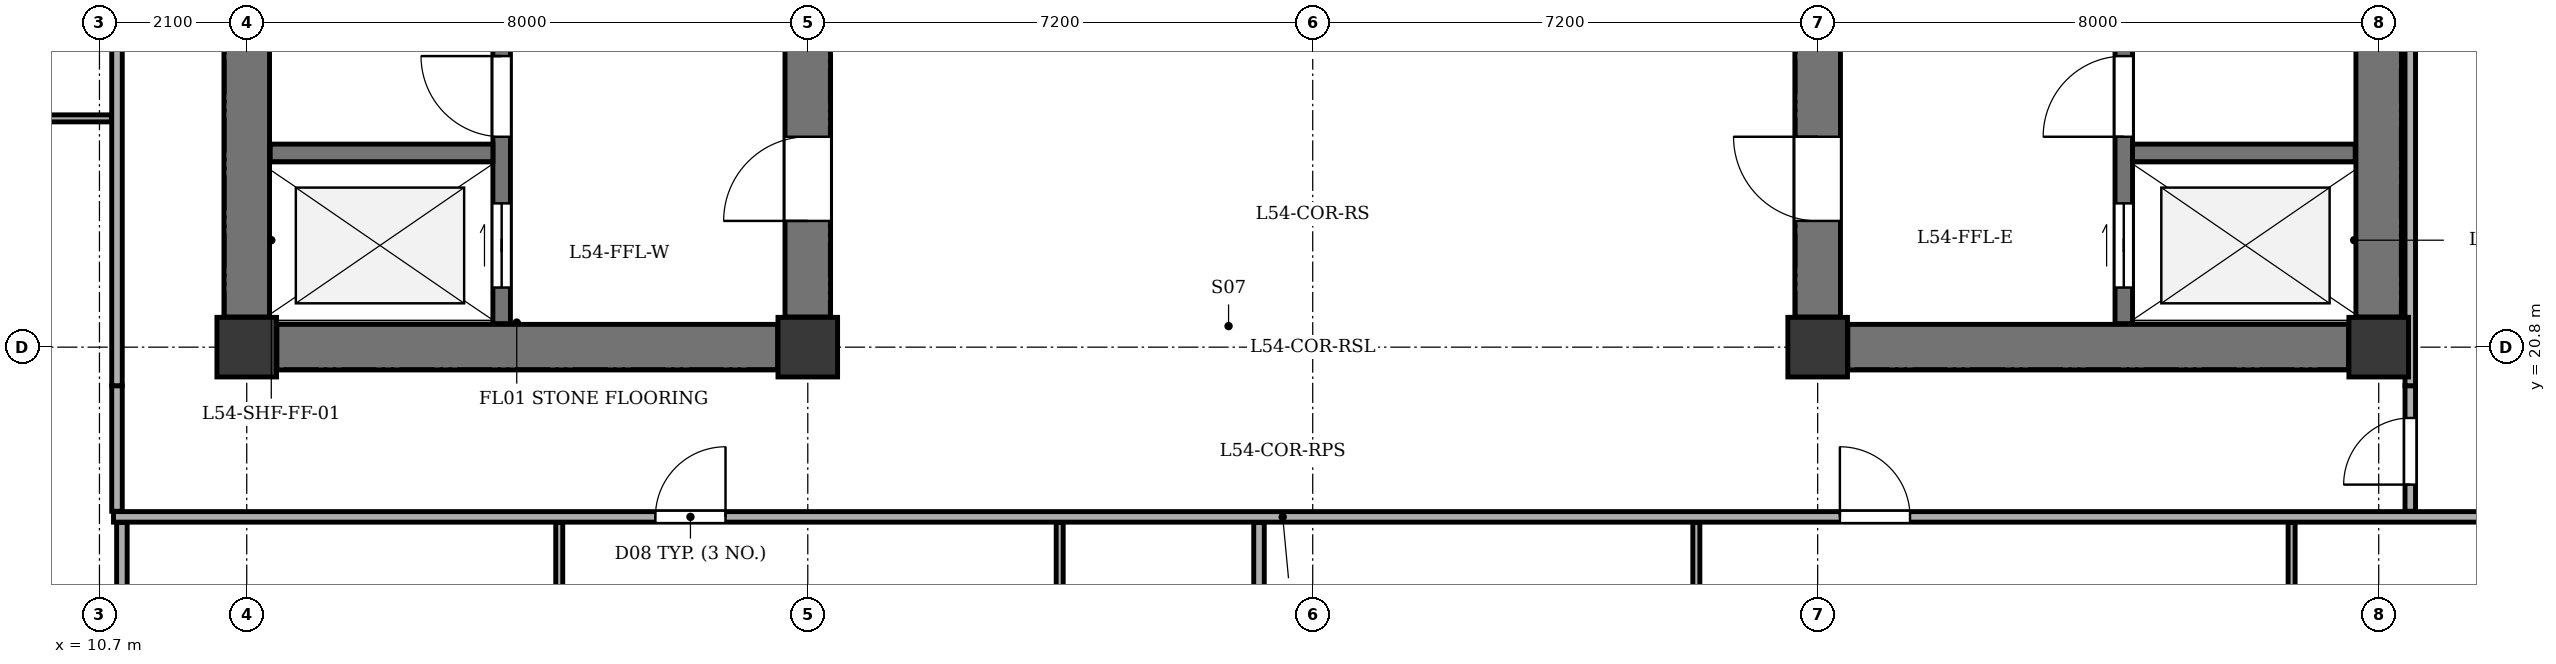
"""IFC4 building model, lengths in metres.
Left out: names, types, materials, properties, quantities, classifications, styles, units other than length and angle.
Written with IfcOpenShell. Run it as: python <this file> out.ifc"""

import sys

from ifc_helpers import new_model, si_unit, direction, frame, frame_2d, origin, origin_2d, place, context, subcontext, project, spatial, rectangle, extrude, element, fill, save


model = new_model("IFC4")
c1 = context("Model", 3, precision=1e-05, world=origin(), true_north=direction((0.0, 1.0)))
c2 = subcontext(c1, "Body", "Model", "MODEL_VIEW")
j1 = project(units=[si_unit("LENGTHUNIT", "METRE"), si_unit("PLANEANGLEUNIT", "RADIAN")], contexts=[c1])
p1 = place(None, origin())
s1 = spatial("IfcSite", under=j1, at=p1, CompositionType="ELEMENT")
p2 = place(p1, origin())
s2 = spatial("IfcBuilding", under=s1, at=p2, CompositionType="ELEMENT")
p3 = place(p2, frame((0.0, 0.0, 210.9)))
s3 = spatial("IfcBuildingStorey", under=s2, at=p3, CompositionType="ELEMENT", Elevation=210.9)
for number, where, z_axis, x_axis in (
    (1, (12.8, 20.8, 0.0), (0.0, 0.0, 1.0), (1.0, 0.0, 0.0)),
    (2, (20.8, 20.8, 0.0), (0.0, 0.0, 1.0), (1.0, 0.0, 0.0)),
    (3, (35.2, 20.8, 0.0), (0.0, 0.0, 1.0), (1.0, 0.0, 0.0)),
    (4, (43.2, 20.8, 0.0), (0.0, 0.0, 1.0), (1.0, 0.0, 0.0)),
):
    element("IfcColumn", number, at=place(p3, frame(where, z_axis=z_axis, x_axis=x_axis)), inside=s3, PredefinedType="COLUMN", context=c2, shape_type="SweptSolid", body=[
        extrude(rectangle(XDim=0.85, YDim=0.85, at=origin_2d()), origin(), (0.0, 0.0, 1.0), 3.4),
    ])
p4 = place(p3, frame((12.8, 21.23, 0.0), z_axis=(0.0, 0.0, 1.0), x_axis=(0.0, 1.0, 0.0)))
e5 = element("IfcWall", 5, at=p4, inside=s3, PredefinedType="SHEAR", context=c2, shape_type="SweptSolid", body=[
    extrude(rectangle(XDim=11.94, YDim=0.65, at=frame_2d((5.97, 0.0))), origin(), (0.0, 0.0, 1.0), 3.1),
])
p5 = place(p3, frame((13.23, 20.8, 0.0), z_axis=(0.0, 0.0, 1.0), x_axis=(1.0, 0.0, 0.0)))
e6 = element("IfcWall", 6, at=p5, inside=s3, PredefinedType="SHEAR", context=c2, shape_type="SweptSolid", body=[
    extrude(rectangle(XDim=7.14, YDim=0.65, at=frame_2d((3.57, 0.0))), origin(), (0.0, 0.0, 1.0), 3.1),
])
p6 = place(p3, frame((20.8, 21.23, 0.0), z_axis=(0.0, 0.0, 1.0), x_axis=(0.0, 1.0, 0.0)))
e7 = element("IfcWall", 7, at=p6, inside=s3, PredefinedType="SHEAR", context=c2, shape_type="SweptSolid", body=[
    extrude(rectangle(XDim=3.82, YDim=0.65, at=frame_2d((1.91, 0.0))), origin(), (0.0, 0.0, 1.0), 3.1),
])
p7 = place(p6, frame((1.37, 0.0, 0.0)))
e8 = element("IfcOpeningElement", 8, at=p7, cuts=e7, PredefinedType="OPENING", context=c2, shape_type="SweptSolid", body=[
    extrude(rectangle(XDim=1.2, YDim=2.15, at=frame_2d((0.6, 1.075))), frame((0.0, 0.335, 0.0), z_axis=(0.0, -1.0, 0.0), x_axis=(1.0, 0.0, 0.0)), (0.0, 0.0, 1.0), 0.67),
])
p8 = place(p3, frame((16.435, 21.135, 0.0), z_axis=(0.0, 0.0, 1.0), x_axis=(0.0, 1.0, 0.0)))
e9 = element("IfcWall", 9, at=p8, inside=s3, PredefinedType="SHEAR", context=c2, shape_type="SweptSolid", body=[
    extrude(rectangle(XDim=12.13, YDim=0.25, at=frame_2d((6.065, 0.0))), origin(), (0.0, 0.0, 1.0), 3.1),
])
p9 = place(p8, frame((0.515, 0.0, 0.0)))
e10 = element("IfcOpeningElement", 10, at=p9, cuts=e9, PredefinedType="OPENING", context=c2, shape_type="SweptSolid", body=[
    extrude(rectangle(XDim=1.2, YDim=2.15, at=frame_2d((0.6, 1.075))), frame((0.0, 0.135, 0.0), z_axis=(0.0, -1.0, 0.0), x_axis=(1.0, 0.0, 0.0)), (0.0, 0.0, 1.0), 0.27),
])
p10 = place(p8, frame((2.665, 0.0, 0.0)))
e11 = element("IfcOpeningElement", 11, at=p10, cuts=e9, PredefinedType="OPENING", context=c2, shape_type="SweptSolid", body=[
    extrude(rectangle(XDim=1.15, YDim=2.15, at=frame_2d((0.575, 1.075))), frame((0.0, 0.135, 0.0), z_axis=(0.0, -1.0, 0.0), x_axis=(1.0, 0.0, 0.0)), (0.0, 0.0, 1.0), 0.27),
])
p11 = place(p3, frame((13.135, 23.57, 0.0), z_axis=(0.0, 0.0, 1.0), x_axis=(1.0, 0.0, 0.0)))
e12 = element("IfcWall", 12, at=p11, inside=s3, PredefinedType="SHEAR", context=c2, shape_type="SweptSolid", body=[
    extrude(rectangle(XDim=3.175, YDim=0.25, at=frame_2d((1.587, 0.0))), origin(), (0.0, 0.0, 1.0), 3.1),
])
p12 = place(p3, frame((43.2, 21.23, 0.0), z_axis=(0.0, 0.0, 1.0), x_axis=(0.0, 1.0, 0.0)))
e13 = element("IfcWall", 13, at=p12, inside=s3, PredefinedType="SHEAR", context=c2, shape_type="SweptSolid", body=[
    extrude(rectangle(XDim=11.94, YDim=0.65, at=frame_2d((5.97, 0.0))), origin(), (0.0, 0.0, 1.0), 3.1),
])
p13 = place(p3, frame((35.63, 20.8, 0.0), z_axis=(0.0, 0.0, 1.0), x_axis=(1.0, 0.0, 0.0)))
e14 = element("IfcWall", 14, at=p13, inside=s3, PredefinedType="SHEAR", context=c2, shape_type="SweptSolid", body=[
    extrude(rectangle(XDim=7.14, YDim=0.65, at=frame_2d((3.57, 0.0))), origin(), (0.0, 0.0, 1.0), 3.1),
])
p14 = place(p3, frame((35.2, 21.23, 0.0), z_axis=(0.0, 0.0, 1.0), x_axis=(0.0, 1.0, 0.0)))
e15 = element("IfcWall", 15, at=p14, inside=s3, PredefinedType="SHEAR", context=c2, shape_type="SweptSolid", body=[
    extrude(rectangle(XDim=3.82, YDim=0.65, at=frame_2d((1.91, 0.0))), origin(), (0.0, 0.0, 1.0), 3.1),
])
p15 = place(p14, frame((1.37, 0.0, 0.0)))
e16 = element("IfcOpeningElement", 16, at=p15, cuts=e15, PredefinedType="OPENING", context=c2, shape_type="SweptSolid", body=[
    extrude(rectangle(XDim=1.2, YDim=2.15, at=frame_2d((0.6, 1.075))), frame((0.0, 0.335, 0.0), z_axis=(0.0, -1.0, 0.0), x_axis=(1.0, 0.0, 0.0)), (0.0, 0.0, 1.0), 0.67),
])
p16 = place(p3, frame((39.565, 21.135, 0.0), z_axis=(0.0, 0.0, 1.0), x_axis=(0.0, 1.0, 0.0)))
e17 = element("IfcWall", 17, at=p16, inside=s3, PredefinedType="SHEAR", context=c2, shape_type="SweptSolid", body=[
    extrude(rectangle(XDim=12.13, YDim=0.25, at=frame_2d((6.065, 0.0))), origin(), (0.0, 0.0, 1.0), 3.1),
])
p17 = place(p16, frame((0.515, 0.0, 0.0)))
e18 = element("IfcOpeningElement", 18, at=p17, cuts=e17, PredefinedType="OPENING", context=c2, shape_type="SweptSolid", body=[
    extrude(rectangle(XDim=1.2, YDim=2.15, at=frame_2d((0.6, 1.075))), frame((0.0, 0.135, 0.0), z_axis=(0.0, -1.0, 0.0), x_axis=(1.0, 0.0, 0.0)), (0.0, 0.0, 1.0), 0.27),
])
p18 = place(p16, frame((2.665, 0.0, 0.0)))
e19 = element("IfcOpeningElement", 19, at=p18, cuts=e17, PredefinedType="OPENING", context=c2, shape_type="SweptSolid", body=[
    extrude(rectangle(XDim=1.15, YDim=2.15, at=frame_2d((0.575, 1.075))), frame((0.0, 0.135, 0.0), z_axis=(0.0, -1.0, 0.0), x_axis=(1.0, 0.0, 0.0)), (0.0, 0.0, 1.0), 0.27),
])
p19 = place(p3, frame((39.69, 23.57, 0.0), z_axis=(0.0, 0.0, 1.0), x_axis=(1.0, 0.0, 0.0)))
e20 = element("IfcWall", 20, at=p19, inside=s3, PredefinedType="SHEAR", context=c2, shape_type="SweptSolid", body=[
    extrude(rectangle(XDim=3.175, YDim=0.25, at=frame_2d((1.587, 0.0))), origin(), (0.0, 0.0, 1.0), 3.1),
])
p20 = place(p3, frame((10.9, 18.38, 0.0), z_axis=(0.0, 0.0, 1.0), x_axis=(1.0, 0.0, 0.0)))
e21 = element("IfcWall", 21, at=p20, inside=s3, PredefinedType="PARTITIONING", context=c2, shape_type="SweptSolid", body=[
    extrude(rectangle(XDim=34.02, YDim=0.15, at=frame_2d((17.01, 0.0))), origin(), (0.0, 0.0, 1.0), 3.1),
])
p21 = place(p20, frame((7.727, 0.0, 0.0)))
e22 = element("IfcOpeningElement", 22, at=p21, cuts=e21, PredefinedType="OPENING", context=c2, shape_type="SweptSolid", body=[
    extrude(rectangle(XDim=1.0, YDim=2.1, at=frame_2d((0.5, 1.05))), frame((0.0, 0.085, 0.0), z_axis=(0.0, -1.0, 0.0), x_axis=(1.0, 0.0, 0.0)), (0.0, 0.0, 1.0), 0.17),
])
p22 = place(p20, frame((24.617, 0.0, 0.0)))
e23 = element("IfcOpeningElement", 23, at=p22, cuts=e21, PredefinedType="OPENING", context=c2, shape_type="SweptSolid", body=[
    extrude(rectangle(XDim=1.0, YDim=2.1, at=frame_2d((0.5, 1.05))), frame((0.0, 0.085, 0.0), z_axis=(0.0, -1.0, 0.0), x_axis=(1.0, 0.0, 0.0)), (0.0, 0.0, 1.0), 0.17),
])
p23 = place(p3, frame((11.02, 3.045, 0.0), z_axis=(0.0, 0.0, 1.0), x_axis=(0.0, 1.0, 0.0)))
e24 = element("IfcWall", 24, at=p23, inside=s3, PredefinedType="PARTITIONING", context=c2, shape_type="SweptSolid", body=[
    extrude(rectangle(XDim=15.255, YDim=0.15, at=frame_2d((7.627, 0.0))), origin(), (0.0, 0.0, 1.0), 3.1),
])
p24 = place(p3, frame((24.392, 5.605, 0.0), z_axis=(0.0, 0.0, 1.0), x_axis=(0.0, 1.0, 0.0)))
e25 = element("IfcWall", 25, at=p24, inside=s3, PredefinedType="PARTITIONING", context=c2, shape_type="SweptSolid", body=[
    extrude(rectangle(XDim=12.695, YDim=0.1, at=frame_2d((6.348, 0.0))), origin(), (0.0, 0.0, 1.0), 3.1),
])
p25 = place(p24, frame((5.91, 0.0, 0.0)))
e26 = element("IfcOpeningElement", 26, at=p25, cuts=e25, PredefinedType="OPENING", context=c2, shape_type="SweptSolid", body=[
    extrude(rectangle(XDim=0.9, YDim=2.05, at=frame_2d((0.45, 1.025))), frame((0.0, 0.06, 0.0), z_axis=(0.0, -1.0, 0.0), x_axis=(1.0, 0.0, 0.0)), (0.0, 0.0, 1.0), 0.12),
])
p26 = place(p3, frame((17.256, 5.605, 0.0), z_axis=(0.0, 0.0, 1.0), x_axis=(0.0, 1.0, 0.0)))
e27 = element("IfcWall", 27, at=p26, inside=s3, PredefinedType="PARTITIONING", context=c2, shape_type="SweptSolid", body=[
    extrude(rectangle(XDim=12.695, YDim=0.1, at=frame_2d((6.348, 0.0))), origin(), (0.0, 0.0, 1.0), 3.1),
])
p27 = place(p26, frame((0.605, 0.0, 0.0)))
e28 = element("IfcOpeningElement", 28, at=p27, cuts=e27, PredefinedType="OPENING", context=c2, shape_type="SweptSolid", body=[
    extrude(rectangle(XDim=0.9, YDim=2.05, at=frame_2d((0.45, 1.025))), frame((0.0, 0.06, 0.0), z_axis=(0.0, -1.0, 0.0), x_axis=(1.0, 0.0, 0.0)), (0.0, 0.0, 1.0), 0.12),
])
p28 = place(p3, frame((27.234, 3.045, 0.0), z_axis=(0.0, 0.0, 1.0), x_axis=(0.0, 1.0, 0.0)))
e29 = element("IfcWall", 29, at=p28, inside=s3, PredefinedType="PARTITIONING", context=c2, shape_type="SweptSolid", body=[
    extrude(rectangle(XDim=15.255, YDim=0.15, at=frame_2d((7.627, 0.0))), origin(), (0.0, 0.0, 1.0), 3.1),
])
p29 = place(p3, frame((41.958, 5.605, 0.0), z_axis=(0.0, 0.0, 1.0), x_axis=(0.0, 1.0, 0.0)))
e30 = element("IfcWall", 30, at=p29, inside=s3, PredefinedType="PARTITIONING", context=c2, shape_type="SweptSolid", body=[
    extrude(rectangle(XDim=12.695, YDim=0.1, at=frame_2d((6.348, 0.0))), origin(), (0.0, 0.0, 1.0), 2.725),
])
p30 = place(p29, frame((5.91, 0.0, 0.0)))
e31 = element("IfcOpeningElement", 31, at=p30, cuts=e30, PredefinedType="OPENING", context=c2, shape_type="SweptSolid", body=[
    extrude(rectangle(XDim=0.9, YDim=2.05, at=frame_2d((0.45, 1.025))), frame((0.0, 0.06, 0.0), z_axis=(0.0, -1.0, 0.0), x_axis=(1.0, 0.0, 0.0)), (0.0, 0.0, 1.0), 0.12),
])
p31 = place(p3, frame((33.47, 5.605, 0.0), z_axis=(0.0, 0.0, 1.0), x_axis=(0.0, 1.0, 0.0)))
e32 = element("IfcWall", 32, at=p31, inside=s3, PredefinedType="PARTITIONING", context=c2, shape_type="SweptSolid", body=[
    extrude(rectangle(XDim=12.695, YDim=0.1, at=frame_2d((6.348, 0.0))), origin(), (0.0, 0.0, 1.0), 2.725),
])
p32 = place(p31, frame((0.605, 0.0, 0.0)))
e33 = element("IfcOpeningElement", 33, at=p32, cuts=e32, PredefinedType="OPENING", context=c2, shape_type="SweptSolid", body=[
    extrude(rectangle(XDim=0.9, YDim=2.05, at=frame_2d((0.45, 1.025))), frame((0.0, 0.06, 0.0), z_axis=(0.0, -1.0, 0.0), x_axis=(1.0, 0.0, 0.0)), (0.0, 0.0, 1.0), 0.12),
])
p33 = place(p3, frame((10.95, 18.46, 0.0), z_axis=(0.0, 0.0, 1.0), x_axis=(0.0, 1.0, 0.0)))
e34 = element("IfcWall", 34, at=p33, inside=s3, PredefinedType="PARTITIONING", context=c2, shape_type="SweptSolid", body=[
    extrude(rectangle(XDim=1.79, YDim=0.15, at=frame_2d((0.895, 0.0))), origin(), (0.0, 0.0, 1.0), 3.1),
])
p34 = place(p3, frame((10.95, 20.25, 0.0), z_axis=(0.0, 0.0, 1.0), x_axis=(0.0, 1.0, 0.0)))
e35 = element("IfcWall", 35, at=p34, inside=s3, PredefinedType="PARTITIONING", context=c2, shape_type="SweptSolid", body=[
    extrude(rectangle(XDim=13.9, YDim=0.15, at=frame_2d((6.95, 0.0))), origin(), (0.0, 0.0, 1.0), 3.1),
])
p35 = place(p3, frame((4.645, 24.062, 0.0), z_axis=(0.0, 0.0, 1.0), x_axis=(1.0, 0.0, 0.0)))
e36 = element("IfcWall", 36, at=p35, inside=s3, PredefinedType="PARTITIONING", context=c2, shape_type="SweptSolid", body=[
    extrude(rectangle(XDim=6.225, YDim=0.1, at=frame_2d((3.113, 0.0))), origin(), (0.0, 0.0, 1.0), 3.1),
])
p36 = place(p35, frame((2.696, 0.0, 0.0)))
e37 = element("IfcOpeningElement", 37, at=p36, cuts=e36, PredefinedType="OPENING", context=c2, shape_type="SweptSolid", body=[
    extrude(rectangle(XDim=0.9, YDim=2.05, at=frame_2d((0.45, 1.025))), frame((0.0, 0.06, 0.0), z_axis=(0.0, -1.0, 0.0), x_axis=(1.0, 0.0, 0.0)), (0.0, 0.0, 1.0), 0.12),
])
p37 = place(p3, frame((43.65, 18.46, 0.0), z_axis=(0.0, 0.0, 1.0), x_axis=(0.0, 1.0, 0.0)))
e38 = element("IfcWall", 38, at=p37, inside=s3, PredefinedType="PARTITIONING", context=c2, shape_type="SweptSolid", body=[
    extrude(rectangle(XDim=1.79, YDim=0.15, at=frame_2d((0.895, 0.0))), origin(), (0.0, 0.0, 1.0), 3.1),
])
p38 = place(p37, frame((0.38, 0.0, 0.0)))
e39 = element("IfcOpeningElement", 39, at=p38, cuts=e38, PredefinedType="OPENING", context=c2, shape_type="SweptSolid", body=[
    extrude(rectangle(XDim=0.95, YDim=2.1, at=frame_2d((0.475, 1.05))), frame((0.0, 0.085, 0.0), z_axis=(0.0, -1.0, 0.0), x_axis=(1.0, 0.0, 0.0)), (0.0, 0.0, 1.0), 0.17),
])
p39 = place(p3, frame((43.65, 20.25, 0.0), z_axis=(0.0, 0.0, 1.0), x_axis=(0.0, 1.0, 0.0)))
e40 = element("IfcWall", 40, at=p39, inside=s3, PredefinedType="PARTITIONING", context=c2, shape_type="SweptSolid", body=[
    extrude(rectangle(XDim=13.27, YDim=0.15, at=frame_2d((6.635, 0.0))), origin(), (0.0, 0.0, 1.0), 3.1),
])
p40 = place(p7, origin())
e41 = element("IfcDoor", 41, at=p40, inside=s3, OperationType="SINGLE_SWING_LEFT", PredefinedType="DOOR", context=c2, shape_type="SweptSolid", body=[
    extrude(rectangle(XDim=1.2, YDim=2.15, at=frame_2d((0.6, 1.075))), frame((0.0, 0.025, 0.0), z_axis=(0.0, -1.0, 0.0), x_axis=(1.0, 0.0, 0.0)), (0.0, 0.0, 1.0), 0.05),
])
fill(e8, e41)
p41 = place(p9, origin())
e42 = element("IfcDoor", 42, at=p41, inside=s3, OperationType="DOUBLE_DOOR_SLIDING", PredefinedType="DOOR", context=c2, shape_type="SweptSolid", body=[
    extrude(rectangle(XDim=1.2, YDim=2.15, at=frame_2d((0.6, 1.075))), frame((0.0, 0.025, 0.0), z_axis=(0.0, -1.0, 0.0), x_axis=(1.0, 0.0, 0.0)), (0.0, 0.0, 1.0), 0.05),
])
fill(e10, e42)
p42 = place(p10, origin())
e43 = element("IfcDoor", 43, at=p42, inside=s3, OperationType="SINGLE_SWING_RIGHT", PredefinedType="DOOR", context=c2, shape_type="SweptSolid", body=[
    extrude(rectangle(XDim=1.15, YDim=2.15, at=frame_2d((0.575, 1.075))), frame((0.0, 0.025, 0.0), z_axis=(0.0, -1.0, 0.0), x_axis=(1.0, 0.0, 0.0)), (0.0, 0.0, 1.0), 0.05),
])
fill(e11, e43)
p43 = place(p15, origin())
e44 = element("IfcDoor", 44, at=p43, inside=s3, OperationType="SINGLE_SWING_RIGHT", PredefinedType="DOOR", context=c2, shape_type="SweptSolid", body=[
    extrude(rectangle(XDim=1.2, YDim=2.15, at=frame_2d((0.6, 1.075))), frame((0.0, 0.025, 0.0), z_axis=(0.0, -1.0, 0.0), x_axis=(1.0, 0.0, 0.0)), (0.0, 0.0, 1.0), 0.05),
])
fill(e16, e44)
p44 = place(p17, origin())
e45 = element("IfcDoor", 45, at=p44, inside=s3, OperationType="DOUBLE_DOOR_SLIDING", PredefinedType="DOOR", context=c2, shape_type="SweptSolid", body=[
    extrude(rectangle(XDim=1.2, YDim=2.15, at=frame_2d((0.6, 1.075))), frame((0.0, 0.025, 0.0), z_axis=(0.0, -1.0, 0.0), x_axis=(1.0, 0.0, 0.0)), (0.0, 0.0, 1.0), 0.05),
])
fill(e18, e45)
p45 = place(p18, origin())
e46 = element("IfcDoor", 46, at=p45, inside=s3, OperationType="SINGLE_SWING_LEFT", PredefinedType="DOOR", context=c2, shape_type="SweptSolid", body=[
    extrude(rectangle(XDim=1.15, YDim=2.15, at=frame_2d((0.575, 1.075))), frame((0.0, 0.025, 0.0), z_axis=(0.0, -1.0, 0.0), x_axis=(1.0, 0.0, 0.0)), (0.0, 0.0, 1.0), 0.05),
])
fill(e19, e46)
p46 = place(p21, origin())
e47 = element("IfcDoor", 47, at=p46, inside=s3, OperationType="SINGLE_SWING_RIGHT", PredefinedType="DOOR", context=c2, shape_type="SweptSolid", body=[
    extrude(rectangle(XDim=1.0, YDim=2.1, at=frame_2d((0.5, 1.05))), frame((0.0, 0.025, 0.0), z_axis=(0.0, -1.0, 0.0), x_axis=(1.0, 0.0, 0.0)), (0.0, 0.0, 1.0), 0.05),
])
fill(e22, e47)
p47 = place(p22, origin())
e48 = element("IfcDoor", 48, at=p47, inside=s3, OperationType="SINGLE_SWING_LEFT", PredefinedType="DOOR", context=c2, shape_type="SweptSolid", body=[
    extrude(rectangle(XDim=1.0, YDim=2.1, at=frame_2d((0.5, 1.05))), frame((0.0, 0.025, 0.0), z_axis=(0.0, -1.0, 0.0), x_axis=(1.0, 0.0, 0.0)), (0.0, 0.0, 1.0), 0.05),
])
fill(e23, e48)
p48 = place(p38, origin())
e49 = element("IfcDoor", 49, at=p48, inside=s3, OperationType="SINGLE_SWING_LEFT", PredefinedType="DOOR", context=c2, shape_type="SweptSolid", body=[
    extrude(rectangle(XDim=0.95, YDim=2.1, at=frame_2d((0.475, 1.05))), frame((0.0, 0.025, 0.0), z_axis=(0.0, -1.0, 0.0), x_axis=(1.0, 0.0, 0.0)), (0.0, 0.0, 1.0), 0.05),
])
fill(e39, e49)
save(model, sys.argv[1])
